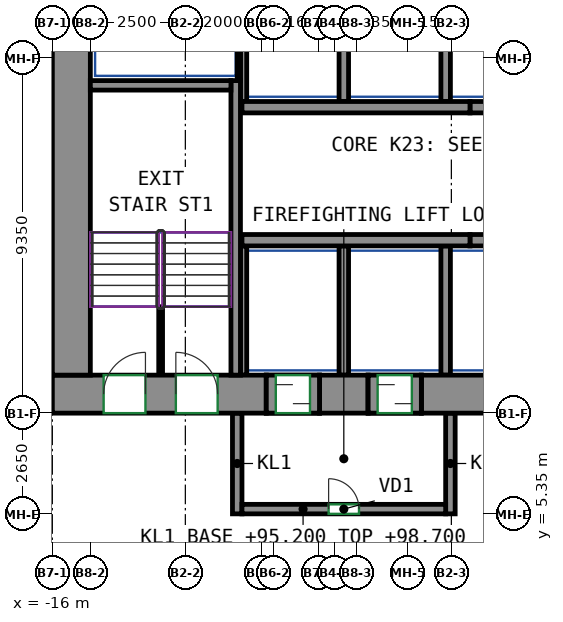
"""IFC4 building model, lengths in metres.
Left out: names, types, materials, properties, quantities, classifications, styles, units other than length and angle.
Written with IfcOpenShell. Run it as: python <this file> out.ifc"""

import sys

from ifc_helpers import new_model, si_unit, direction, frame, frame_2d, origin, place, context, subcontext, project, spatial, rectangle, extrude, source, transform, mapped, element, fill, save


model = new_model("IFC4")
c1 = context("Model", 3, precision=1e-05, world=origin(), true_north=direction((0.0, 1.0)))
c2 = subcontext(c1, "Body", "Model", "MODEL_VIEW")
j1 = project(units=[si_unit("LENGTHUNIT", "METRE"), si_unit("PLANEANGLEUNIT", "RADIAN")], contexts=[c1])
p1 = place(None, origin())
s1 = spatial("IfcSite", under=j1, at=p1, CompositionType="ELEMENT")
p2 = place(p1, origin())
s2 = spatial("IfcBuilding", under=s1, at=p2, CompositionType="ELEMENT")
p3 = place(p2, frame((0.0, 0.0, 95.2)))
s3 = spatial("IfcBuildingStorey", under=s2, at=p3, CompositionType="ELEMENT", Elevation=95.2)
m1 = source(origin(), c2, "Body", "SweptSolid", [
    extrude(rectangle(XDim=5.63, YDim=1.0, at=frame_2d((2.815, 0.0))), origin(), (0.0, 0.0, 1.0), 5.0),
])
p4 = place(p3, frame((-16.0, 8.5, 0.0), z_axis=(0.0, 0.0, 1.0), x_axis=(1.0, 0.0, 0.0)))
e1 = element("IfcWall", 1, at=p4, inside=s3, PredefinedType="SHEAR", context=c2, shape_type="MappedRepresentation", body=[
    mapped(m1, transform((0.0, 0.0, 0.0))),
])
p5 = place(p4, frame((1.35, 0.0, 0.0)))
e2 = element("IfcOpeningElement", 2, at=p5, cuts=e1, PredefinedType="OPENING", context=c2, shape_type="SweptSolid", body=[
    extrude(rectangle(XDim=1.1, YDim=2.1, at=frame_2d((0.55, 1.05))), frame((0.0, 0.51, 0.0), z_axis=(0.0, -1.0, 0.0), x_axis=(1.0, 0.0, 0.0)), (0.0, 0.0, 1.0), 1.02),
])
p6 = place(p4, frame((3.25, 0.0, 0.0)))
e3 = element("IfcOpeningElement", 3, at=p6, cuts=e1, PredefinedType="OPENING", context=c2, shape_type="SweptSolid", body=[
    extrude(rectangle(XDim=1.1, YDim=2.1, at=frame_2d((0.55, 1.05))), frame((0.0, 0.51, 0.0), z_axis=(0.0, -1.0, 0.0), x_axis=(1.0, 0.0, 0.0)), (0.0, 0.0, 1.0), 1.02),
])
m2 = source(origin(), c2, "Body", "SweptSolid", [
    extrude(rectangle(XDim=1.28, YDim=1.0, at=frame_2d((0.64, 0.0))), origin(), (0.0, 0.0, 1.0), 5.0),
])
p7 = place(p3, frame((-8.97, 8.5, 0.0), z_axis=(0.0, 0.0, 1.0), x_axis=(1.0, 0.0, 0.0)))
e4 = element("IfcWall", 4, at=p7, inside=s3, PredefinedType="SHEAR", context=c2, shape_type="MappedRepresentation", body=[
    mapped(m2, transform((0.0, 0.0, 0.0))),
])
m3 = source(origin(), c2, "Body", "SweptSolid", [
    extrude(rectangle(XDim=14.18, YDim=1.0, at=frame_2d((7.09, 0.0))), origin(), (0.0, 0.0, 1.0), 5.0),
])
p8 = place(p3, frame((-6.29, 8.5, 0.0), z_axis=(0.0, 0.0, 1.0), x_axis=(1.0, 0.0, 0.0)))
e5 = element("IfcWall", 5, at=p8, inside=s3, PredefinedType="SHEAR", context=c2, shape_type="MappedRepresentation", body=[
    mapped(m3, transform((0.0, 0.0, 0.0))),
])
m4 = source(origin(), c2, "Body", "SweptSolid", [
    extrude(rectangle(XDim=12.0, YDim=1.0, at=frame_2d((6.0, 0.0))), origin(), (0.0, 0.0, 1.0), 5.0),
])
p9 = place(p3, frame((-15.5, 9.0, 0.0), z_axis=(0.0, 0.0, 1.0), x_axis=(0.0, 1.0, 0.0)))
e6 = element("IfcWall", 6, at=p9, inside=s3, PredefinedType="SHEAR", context=c2, shape_type="MappedRepresentation", body=[
    mapped(m4, transform((0.0, 0.0, 0.0))),
])
m5 = source(origin(), c2, "Body", "SweptSolid", [
    extrude(rectangle(XDim=7.75, YDim=0.25, at=frame_2d((3.875, 0.0))), origin(), (0.0, 0.0, 1.0), 5.0),
])
p10 = place(p3, frame((-11.175, 9.0, 0.0), z_axis=(0.0, 0.0, 1.0), x_axis=(0.0, 1.0, 0.0)))
e7 = element("IfcWall", 7, at=p10, inside=s3, PredefinedType="SHEAR", context=c2, shape_type="MappedRepresentation", body=[
    mapped(m5, transform((0.0, 0.0, 0.0))),
])
m6 = source(origin(), c2, "Body", "SweptSolid", [
    extrude(rectangle(XDim=3.7, YDim=0.25, at=frame_2d((1.85, 0.0))), origin(), (0.0, 0.0, 1.0), 5.0),
])
p11 = place(p3, frame((-15.0, 16.625, 0.0), z_axis=(0.0, 0.0, 1.0), x_axis=(1.0, 0.0, 0.0)))
e8 = element("IfcWall", 8, at=p11, inside=s3, PredefinedType="SHEAR", context=c2, shape_type="MappedRepresentation", body=[
    mapped(m6, transform((0.0, 0.0, 0.0))),
])
m7 = source(origin(), c2, "Body", "SweptSolid", [
    extrude(rectangle(XDim=6.0, YDim=0.3, at=frame_2d((3.0, 0.0))), origin(), (0.0, 0.0, 1.0), 5.0),
])
for number, where, z_axis, x_axis in (
    (9, (-11.01, 12.55, 0.0), (0.0, 0.0, 1.0), (1.0, 0.0, 0.0)),
    (10, (-11.01, 16.05, 0.0), (0.0, 0.0, 1.0), (1.0, 0.0, 0.0)),
):
    element("IfcWall", number, at=place(p3, frame(where, z_axis=z_axis, x_axis=x_axis)), inside=s3, PredefinedType="SHEAR", context=c2, shape_type="MappedRepresentation", body=[
        mapped(m7, transform((0.0, 0.0, 0.0))),
    ])
m8 = source(origin(), c2, "Body", "SweptSolid", [
    extrude(rectangle(XDim=1.4, YDim=1.0, at=frame_2d((0.7, 0.0))), origin(), (0.0, 0.0, 1.0), 1.1),
])
p12 = place(p3, frame((-10.37, 8.5, 3.9), z_axis=(0.0, 0.0, 1.0), x_axis=(1.0, 0.0, 0.0)))
e11 = element("IfcWall", 11, at=p12, inside=s3, PredefinedType="SHEAR", context=c2, shape_type="MappedRepresentation", body=[
    mapped(m8, transform((0.0, 0.0, 0.0))),
])
m9 = source(origin(), c2, "Body", "SweptSolid", [
    extrude(rectangle(XDim=1.4, YDim=1.0, at=frame_2d((0.7, 0.0))), origin(), (0.0, 0.0, 1.0), 1.05),
])
p13 = place(p3, frame((-7.69, 8.5, 3.95), z_axis=(0.0, 0.0, 1.0), x_axis=(1.0, 0.0, 0.0)))
e12 = element("IfcWall", 12, at=p13, inside=s3, PredefinedType="SHEAR", context=c2, shape_type="MappedRepresentation", body=[
    mapped(m9, transform((0.0, 0.0, 0.0))),
])
m10 = source(origin(), c2, "Body", "SweptSolid", [
    extrude(rectangle(XDim=1.4, YDim=0.3, at=frame_2d((0.7, 0.0))), origin(), (0.0, 0.0, 1.0), 5.0),
])
for number, where, z_axis, x_axis in (
    (13, (-5.01, 12.55, 0.0), (0.0, 0.0, 1.0), (1.0, 0.0, 0.0)),
    (14, (-5.01, 16.05, 0.0), (0.0, 0.0, 1.0), (1.0, 0.0, 0.0)),
):
    element("IfcWall", number, at=place(p3, frame(where, z_axis=z_axis, x_axis=x_axis)), inside=s3, PredefinedType="PARTITIONING", context=c2, shape_type="MappedRepresentation", body=[
        mapped(m10, transform((0.0, 0.0, 0.0))),
    ])
m11 = source(origin(), c2, "Body", "SweptSolid", [
    extrude(rectangle(XDim=2.65, YDim=0.25, at=frame_2d((1.325, 0.0))), origin(), (0.0, 0.0, 1.0), 5.0),
])
p14 = place(p3, frame((-11.135, 5.35, 0.0), z_axis=(0.0, 0.0, 1.0), x_axis=(0.0, 1.0, 0.0)))
e15 = element("IfcWall", 15, at=p14, inside=s3, PredefinedType="PARTITIONING", context=c2, shape_type="MappedRepresentation", body=[
    mapped(m11, transform((0.0, 0.0, 0.0))),
])
m12 = source(origin(), c2, "Body", "SweptSolid", [
    extrude(rectangle(XDim=2.65, YDim=0.25, at=frame_2d((1.325, 0.0))), origin(), (0.0, 0.0, 1.0), 3.5),
])
p15 = place(p3, frame((-5.525, 5.35, 0.0), z_axis=(0.0, 0.0, 1.0), x_axis=(0.0, 1.0, 0.0)))
e16 = element("IfcWall", 16, at=p15, inside=s3, PredefinedType="PARTITIONING", context=c2, shape_type="MappedRepresentation", body=[
    mapped(m12, transform((0.0, 0.0, 0.0))),
])
m13 = source(origin(), c2, "Body", "SweptSolid", [
    extrude(rectangle(XDim=5.36, YDim=0.25, at=frame_2d((2.68, 0.0))), origin(), (0.0, 0.0, 1.0), 3.5),
])
p16 = place(p3, frame((-11.01, 5.475, 0.0), z_axis=(0.0, 0.0, 1.0), x_axis=(1.0, 0.0, 0.0)))
e17 = element("IfcWall", 17, at=p16, inside=s3, PredefinedType="PARTITIONING", context=c2, shape_type="MappedRepresentation", body=[
    mapped(m13, transform((0.0, 0.0, 0.0))),
])
p17 = place(p16, frame((2.28, 0.0, 0.0)))
e18 = element("IfcOpeningElement", 18, at=p17, cuts=e17, PredefinedType="OPENING", context=c2, shape_type="SweptSolid", body=[
    extrude(rectangle(XDim=0.8, YDim=2.0, at=frame_2d((0.4, 1.0))), frame((0.0, 0.135, 0.0), z_axis=(0.0, -1.0, 0.0), x_axis=(1.0, 0.0, 0.0)), (0.0, 0.0, 1.0), 0.27),
])
m14 = source(origin(), c2, "Body", "SweptSolid", [
    extrude(rectangle(XDim=3.275, YDim=0.165, at=frame_2d((1.638, 0.0))), origin(), (0.0, 0.0, 1.0), 5.0),
])
p18 = place(p3, frame((-10.968, 16.2, 0.0), z_axis=(0.0, 0.0, 1.0), x_axis=(0.0, 1.0, 0.0)))
e19 = element("IfcWall", 19, at=p18, inside=s3, PredefinedType="PARTITIONING", context=c2, shape_type="MappedRepresentation", body=[
    mapped(m14, transform((0.0, 0.0, 0.0))),
])
m15 = source(origin(), c2, "Body", "SweptSolid", [
    extrude(rectangle(XDim=2.725, YDim=0.085, at=frame_2d((1.363, 0.0))), origin(), (0.0, 0.0, 1.0), 5.0),
])
p19 = place(p3, frame((-11.093, 16.75, 0.0), z_axis=(0.0, 0.0, 1.0), x_axis=(0.0, 1.0, 0.0)))
e20 = element("IfcWall", 20, at=p19, inside=s3, PredefinedType="PARTITIONING", context=c2, shape_type="MappedRepresentation", body=[
    mapped(m15, transform((0.0, 0.0, 0.0))),
])
m16 = source(origin(), c2, "Body", "SweptSolid", [
    extrude(rectangle(XDim=3.275, YDim=0.25, at=frame_2d((1.638, 0.0))), origin(), (0.0, 0.0, 1.0), 5.0),
])
for number, where, z_axis, x_axis in (
    (21, (-5.65, 16.2, 0.0), (0.0, 0.0, 1.0), (0.0, 1.0, 0.0)),
    (22, (-8.33, 16.2, 0.0), (0.0, 0.0, 1.0), (0.0, 1.0, 0.0)),
):
    element("IfcWall", number, at=place(p3, frame(where, z_axis=z_axis, x_axis=x_axis)), inside=s3, PredefinedType="PARTITIONING", context=c2, shape_type="MappedRepresentation", body=[
        mapped(m16, transform((0.0, 0.0, 0.0))),
    ])
m17 = source(origin(), c2, "Body", "SweptSolid", [
    extrude(rectangle(XDim=3.4, YDim=0.165, at=frame_2d((1.7, 0.0))), origin(), (0.0, 0.0, 1.0), 5.0),
])
p20 = place(p3, frame((-10.968, 9.0, 0.0), z_axis=(0.0, 0.0, 1.0), x_axis=(0.0, 1.0, 0.0)))
e23 = element("IfcWall", 23, at=p20, inside=s3, PredefinedType="PARTITIONING", context=c2, shape_type="MappedRepresentation", body=[
    mapped(m17, transform((0.0, 0.0, 0.0))),
])
m18 = source(origin(), c2, "Body", "SweptSolid", [
    extrude(rectangle(XDim=3.4, YDim=0.25, at=frame_2d((1.7, 0.0))), origin(), (0.0, 0.0, 1.0), 5.0),
])
for number, where, z_axis, x_axis in (
    (24, (-5.65, 9.0, 0.0), (0.0, 0.0, 1.0), (0.0, 1.0, 0.0)),
    (25, (-8.33, 9.0, 0.0), (0.0, 0.0, 1.0), (0.0, 1.0, 0.0)),
):
    element("IfcWall", number, at=place(p3, frame(where, z_axis=z_axis, x_axis=x_axis)), inside=s3, PredefinedType="PARTITIONING", context=c2, shape_type="MappedRepresentation", body=[
        mapped(m18, transform((0.0, 0.0, 0.0))),
    ])
m19 = source(origin(), c2, "Body", "SweptSolid", [
    extrude(rectangle(XDim=1.4, YDim=1.0, at=frame_2d((0.7, 0.0))), origin(), (0.0, 0.0, 1.0), 2.7),
])
p21 = place(p3, frame((-10.37, 8.5, 0.0), z_axis=(0.0, 0.0, 1.0), x_axis=(1.0, 0.0, 0.0)))
e26 = element("IfcWall", 26, at=p21, inside=s3, PredefinedType="PARTITIONING", context=c2, shape_type="MappedRepresentation", body=[
    mapped(m19, transform((0.0, 0.0, 0.0))),
])
p22 = place(p21, frame((0.25, 0.0, 0.0)))
e27 = element("IfcOpeningElement", 27, at=p22, cuts=e26, PredefinedType="OPENING", context=c2, shape_type="SweptSolid", body=[
    extrude(rectangle(XDim=0.9, YDim=2.1, at=frame_2d((0.45, 1.05))), frame((0.0, 0.51, 0.0), z_axis=(0.0, -1.0, 0.0), x_axis=(1.0, 0.0, 0.0)), (0.0, 0.0, 1.0), 1.02),
])
m20 = source(origin(), c2, "Body", "SweptSolid", [
    extrude(rectangle(XDim=1.4, YDim=1.0, at=frame_2d((0.7, 0.0))), origin(), (0.0, 0.0, 1.0), 2.7),
])
p23 = place(p3, frame((-7.69, 8.5, 0.0), z_axis=(0.0, 0.0, 1.0), x_axis=(1.0, 0.0, 0.0)))
e28 = element("IfcWall", 28, at=p23, inside=s3, PredefinedType="PARTITIONING", context=c2, shape_type="MappedRepresentation", body=[
    mapped(m20, transform((0.0, 0.0, 0.0))),
])
p24 = place(p23, frame((0.25, 0.0, 0.0)))
e29 = element("IfcOpeningElement", 29, at=p24, cuts=e28, PredefinedType="OPENING", context=c2, shape_type="SweptSolid", body=[
    extrude(rectangle(XDim=0.9, YDim=2.1, at=frame_2d((0.45, 1.05))), frame((0.0, 0.51, 0.0), z_axis=(0.0, -1.0, 0.0), x_axis=(1.0, 0.0, 0.0)), (0.0, 0.0, 1.0), 1.02),
])
m21 = source(origin(), c2, "Body", "SweptSolid", [
    extrude(rectangle(XDim=1.8, YDim=0.1, at=frame_2d((0.9, 0.0))), origin(), (0.0, 0.0, 1.0), 2.5),
])
p25 = place(p3, frame((-13.15, 9.0, 0.0), z_axis=(0.0, 0.0, 1.0), x_axis=(0.0, 1.0, 0.0)))
e30 = element("IfcWall", 30, at=p25, inside=s3, PredefinedType="PARTITIONING", context=c2, shape_type="MappedRepresentation", body=[
    mapped(m21, transform((0.0, 0.0, 0.0))),
])
p26 = place(p17, origin())
e31 = element("IfcDoor", 31, at=p26, inside=s3, OperationType="SINGLE_SWING_LEFT", PredefinedType="DOOR", context=c2, shape_type="SweptSolid", body=[
    extrude(rectangle(XDim=0.8, YDim=2.0, at=frame_2d((0.4, 1.0))), frame((0.0, 0.025, 0.0), z_axis=(0.0, -1.0, 0.0), x_axis=(1.0, 0.0, 0.0)), (0.0, 0.0, 1.0), 0.05),
])
fill(e18, e31)
p27 = place(p22, origin())
e32 = element("IfcDoor", 32, at=p27, inside=s3, OperationType="SLIDING_TO_LEFT", PredefinedType="DOOR", context=c2, shape_type="SweptSolid", body=[
    extrude(rectangle(XDim=0.9, YDim=2.1, at=frame_2d((0.45, 1.05))), frame((0.0, 0.405, 0.0), z_axis=(0.0, -1.0, 0.0), x_axis=(1.0, 0.0, 0.0)), (0.0, 0.0, 1.0), 0.05),
])
fill(e27, e32)
p28 = place(p24, origin())
e33 = element("IfcDoor", 33, at=p28, inside=s3, OperationType="SLIDING_TO_RIGHT", PredefinedType="DOOR", context=c2, shape_type="SweptSolid", body=[
    extrude(rectangle(XDim=0.9, YDim=2.1, at=frame_2d((0.45, 1.05))), frame((0.0, 0.405, 0.0), z_axis=(0.0, -1.0, 0.0), x_axis=(1.0, 0.0, 0.0)), (0.0, 0.0, 1.0), 0.05),
])
fill(e29, e33)
p29 = place(p5, origin())
e34 = element("IfcDoor", 34, at=p29, inside=s3, OperationType="SINGLE_SWING_RIGHT", PredefinedType="DOOR", context=c2, shape_type="SweptSolid", body=[
    extrude(rectangle(XDim=1.1, YDim=2.1, at=frame_2d((0.55, 1.05))), frame((0.0, 0.405, 0.0), z_axis=(0.0, -1.0, 0.0), x_axis=(1.0, 0.0, 0.0)), (0.0, 0.0, 1.0), 0.05),
])
fill(e2, e34)
p30 = place(p6, origin())
e35 = element("IfcDoor", 35, at=p30, inside=s3, OperationType="SINGLE_SWING_LEFT", PredefinedType="DOOR", context=c2, shape_type="SweptSolid", body=[
    extrude(rectangle(XDim=1.1, YDim=2.1, at=frame_2d((0.55, 1.05))), frame((0.0, 0.405, 0.0), z_axis=(0.0, -1.0, 0.0), x_axis=(1.0, 0.0, 0.0)), (0.0, 0.0, 1.0), 0.05),
])
fill(e3, e35)
save(model, sys.argv[1])
